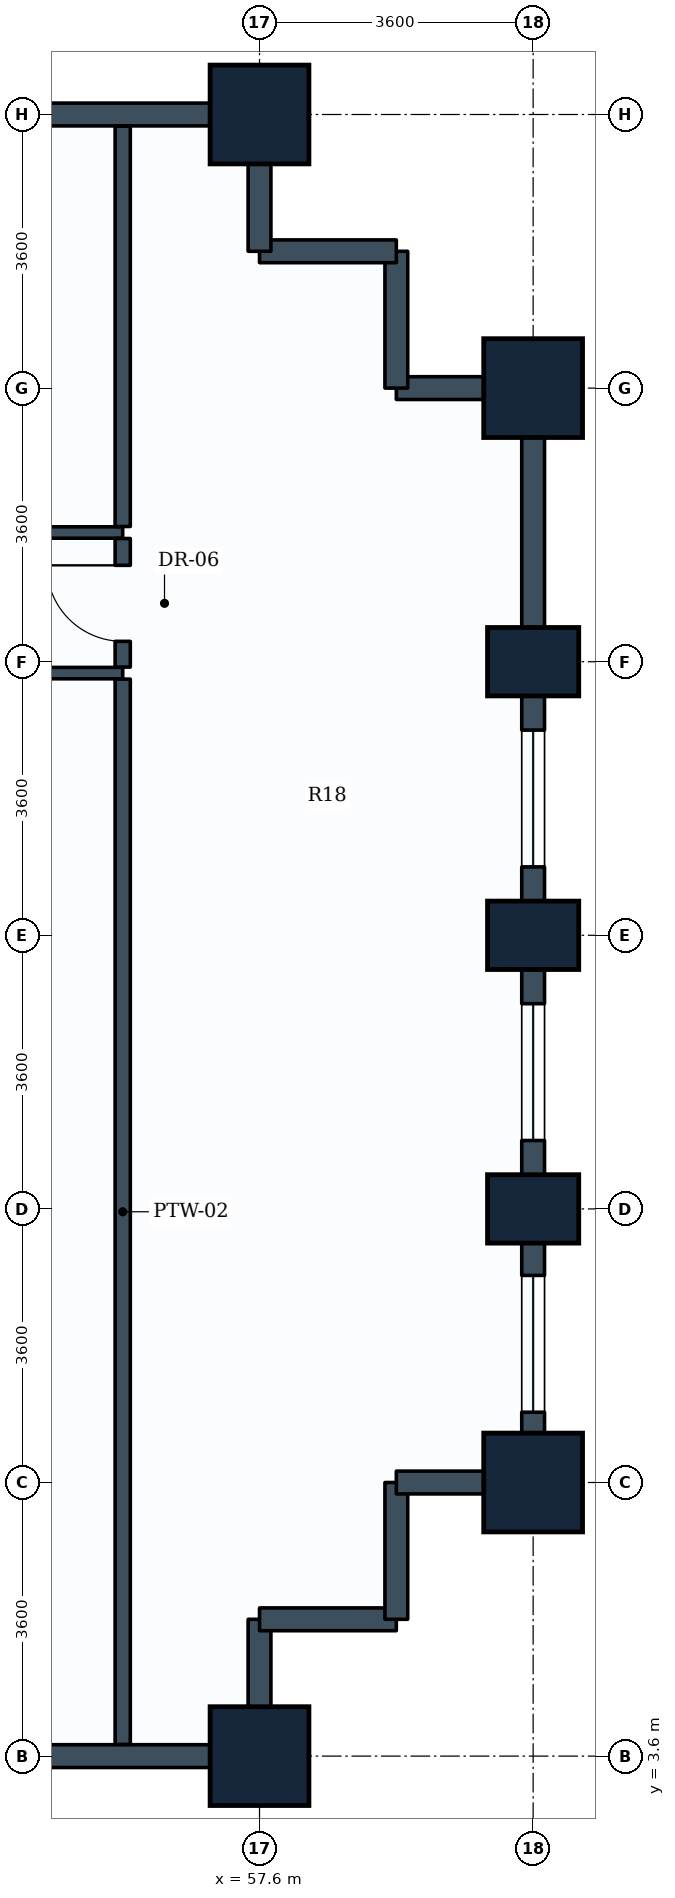
"""IFC4 building model, lengths in metres.
Left out: names, types, materials, properties, quantities, classifications, styles, units other than length and angle.
Written with IfcOpenShell. Run it as: python <this file> out.ifc"""

import sys

from ifc_helpers import new_model, si_unit, direction, frame, frame_2d, origin, origin_2d, place, context, subcontext, project, spatial, rectangle, extrude, element, fill, save


model = new_model("IFC4")
c1 = context("Model", 3, precision=1e-05, world=origin(), true_north=direction((0.0, 1.0)))
c2 = subcontext(c1, "Body", "Model", "MODEL_VIEW")
j1 = project(units=[si_unit("LENGTHUNIT", "METRE"), si_unit("PLANEANGLEUNIT", "RADIAN")], contexts=[c1])
p1 = place(None, origin())
s1 = spatial("IfcSite", under=j1, at=p1, CompositionType="ELEMENT")
p2 = place(p1, origin())
s2 = spatial("IfcBuilding", under=s1, at=p2, CompositionType="ELEMENT")
p3 = place(p2, frame((0.0, 0.0, 47.4)))
s3 = spatial("IfcBuildingStorey", under=s2, at=p3, CompositionType="ELEMENT", Elevation=47.4)
for number, where, z_axis, x_axis in (
    (1, (57.6, 3.6, 0.0), (0.0, 0.0, 1.0), (1.0, 0.0, 0.0)),
    (2, (57.6, 25.2, 0.0), (0.0, 0.0, 1.0), (1.0, 0.0, 0.0)),
    (3, (61.2, 7.2, 0.0), (0.0, 0.0, 1.0), (1.0, 0.0, 0.0)),
):
    element("IfcColumn", number, at=place(p3, frame(where, z_axis=z_axis, x_axis=x_axis)), inside=s3, PredefinedType="COLUMN", context=c2, shape_type="SweptSolid", body=[
        extrude(rectangle(XDim=1.3, YDim=1.3, at=origin_2d()), origin(), (0.0, 0.0, 1.0), 3.9),
    ])
for number, where, z_axis, x_axis in (
    (4, (61.2, 10.8, 0.0), (0.0, 0.0, 1.0), (0.0, 1.0, 0.0)),
    (5, (61.2, 14.4, 0.0), (0.0, 0.0, 1.0), (0.0, 1.0, 0.0)),
    (6, (61.2, 18.0, 0.0), (0.0, 0.0, 1.0), (0.0, 1.0, 0.0)),
):
    element("IfcColumn", number, at=place(p3, frame(where, z_axis=z_axis, x_axis=x_axis)), inside=s3, PredefinedType="COLUMN", context=c2, shape_type="SweptSolid", body=[
        extrude(rectangle(XDim=0.9, YDim=1.2, at=origin_2d()), origin(), (0.0, 0.0, 1.0), 3.9),
    ])
p4 = place(p3, frame((61.2, 21.6, 0.0), z_axis=(0.0, 0.0, 1.0), x_axis=(0.0, 1.0, 0.0)))
e7 = element("IfcColumn", 7, at=p4, inside=s3, PredefinedType="COLUMN", context=c2, shape_type="SweptSolid", body=[
    extrude(rectangle(XDim=1.3, YDim=1.3, at=origin_2d()), origin(), (0.0, 0.0, 1.0), 3.9),
])
p5 = place(p3, frame((57.6, 3.6, 0.0), z_axis=(0.0, 0.0, 1.0), x_axis=(-1.0, 0.0, 0.0)))
e8 = element("IfcWall", 8, at=p5, inside=s3, PredefinedType="STANDARD", context=c2, shape_type="SweptSolid", body=[
    extrude(rectangle(XDim=3.6, YDim=0.3, at=frame_2d((1.8, 0.0))), origin(), (0.0, 0.0, 1.0), 2.93),
])
p6 = place(p3, frame((57.6, 5.4, 0.0), z_axis=(0.0, 0.0, 1.0), x_axis=(0.0, -1.0, 0.0)))
e9 = element("IfcWall", 9, at=p6, inside=s3, PredefinedType="STANDARD", context=c2, shape_type="SweptSolid", body=[
    extrude(rectangle(XDim=1.8, YDim=0.3, at=frame_2d((0.9, 0.0))), origin(), (0.0, 0.0, 1.0), 2.93),
])
p7 = place(p3, frame((59.4, 5.4, 0.0), z_axis=(0.0, 0.0, 1.0), x_axis=(-1.0, 0.0, 0.0)))
e10 = element("IfcWall", 10, at=p7, inside=s3, PredefinedType="STANDARD", context=c2, shape_type="SweptSolid", body=[
    extrude(rectangle(XDim=1.8, YDim=0.3, at=frame_2d((0.9, 0.0))), origin(), (0.0, 0.0, 1.0), 3.635),
])
p8 = place(p3, frame((59.4, 7.2, 0.0), z_axis=(0.0, 0.0, 1.0), x_axis=(0.0, -1.0, 0.0)))
e11 = element("IfcWall", 11, at=p8, inside=s3, PredefinedType="STANDARD", context=c2, shape_type="SweptSolid", body=[
    extrude(rectangle(XDim=1.8, YDim=0.3, at=frame_2d((0.9, 0.0))), origin(), (0.0, 0.0, 1.0), 3.635),
])
p9 = place(p3, frame((61.2, 7.2, 0.0), z_axis=(0.0, 0.0, 1.0), x_axis=(-1.0, 0.0, 0.0)))
e12 = element("IfcWall", 12, at=p9, inside=s3, PredefinedType="STANDARD", context=c2, shape_type="SweptSolid", body=[
    extrude(rectangle(XDim=1.8, YDim=0.3, at=frame_2d((0.9, 0.0))), origin(), (0.0, 0.0, 1.0), 2.93),
])
p10 = place(p3, frame((61.2, 10.8, 0.0), z_axis=(0.0, 0.0, 1.0), x_axis=(0.0, -1.0, 0.0)))
e13 = element("IfcWall", 13, at=p10, inside=s3, PredefinedType="STANDARD", context=c2, shape_type="SweptSolid", body=[
    extrude(rectangle(XDim=3.6, YDim=0.3, at=frame_2d((1.8, 0.0))), origin(), (0.0, 0.0, 1.0), 2.93),
])
p11 = place(p10, frame((0.875, 0.0, 0.85)))
e14 = element("IfcOpeningElement", 14, at=p11, cuts=e13, PredefinedType="OPENING", context=c2, shape_type="SweptSolid", body=[
    extrude(rectangle(XDim=1.8, YDim=1.35, at=frame_2d((0.9, 0.675))), frame((0.0, 0.16, 0.0), z_axis=(0.0, -1.0, 0.0), x_axis=(1.0, 0.0, 0.0)), (0.0, 0.0, 1.0), 0.32),
])
p12 = place(p3, frame((61.2, 14.4, 0.0), z_axis=(0.0, 0.0, 1.0), x_axis=(0.0, -1.0, 0.0)))
e15 = element("IfcWall", 15, at=p12, inside=s3, PredefinedType="STANDARD", context=c2, shape_type="SweptSolid", body=[
    extrude(rectangle(XDim=3.6, YDim=0.3, at=frame_2d((1.8, 0.0))), origin(), (0.0, 0.0, 1.0), 2.93),
])
p13 = place(p12, frame((0.9, 0.0, 0.85)))
e16 = element("IfcOpeningElement", 16, at=p13, cuts=e15, PredefinedType="OPENING", context=c2, shape_type="SweptSolid", body=[
    extrude(rectangle(XDim=1.8, YDim=1.35, at=frame_2d((0.9, 0.675))), frame((0.0, 0.16, 0.0), z_axis=(0.0, -1.0, 0.0), x_axis=(1.0, 0.0, 0.0)), (0.0, 0.0, 1.0), 0.32),
])
p14 = place(p3, frame((61.2, 18.0, 0.0), z_axis=(0.0, 0.0, 1.0), x_axis=(0.0, -1.0, 0.0)))
e17 = element("IfcWall", 17, at=p14, inside=s3, PredefinedType="STANDARD", context=c2, shape_type="SweptSolid", body=[
    extrude(rectangle(XDim=3.6, YDim=0.3, at=frame_2d((1.8, 0.0))), origin(), (0.0, 0.0, 1.0), 2.93),
])
p15 = place(p14, frame((0.9, 0.0, 0.85)))
e18 = element("IfcOpeningElement", 18, at=p15, cuts=e17, PredefinedType="OPENING", context=c2, shape_type="SweptSolid", body=[
    extrude(rectangle(XDim=1.8, YDim=1.35, at=frame_2d((0.9, 0.675))), frame((0.0, 0.16, 0.0), z_axis=(0.0, -1.0, 0.0), x_axis=(1.0, 0.0, 0.0)), (0.0, 0.0, 1.0), 0.32),
])
p16 = place(p3, frame((61.2, 21.6, 0.0), z_axis=(0.0, 0.0, 1.0), x_axis=(0.0, -1.0, 0.0)))
e19 = element("IfcWall", 19, at=p16, inside=s3, PredefinedType="STANDARD", context=c2, shape_type="SweptSolid", body=[
    extrude(rectangle(XDim=3.6, YDim=0.3, at=frame_2d((1.8, 0.0))), origin(), (0.0, 0.0, 1.0), 2.93),
])
p17 = place(p3, frame((61.2, 21.6, 0.0), z_axis=(0.0, 0.0, 1.0), x_axis=(-1.0, 0.0, 0.0)))
e20 = element("IfcWall", 20, at=p17, inside=s3, PredefinedType="STANDARD", context=c2, shape_type="SweptSolid", body=[
    extrude(rectangle(XDim=1.8, YDim=0.3, at=frame_2d((0.9, 0.0))), origin(), (0.0, 0.0, 1.0), 2.93),
])
for number, where, z_axis, x_axis in (
    (21, (59.4, 23.4, 0.0), (0.0, 0.0, 1.0), (0.0, -1.0, 0.0)),
    (22, (57.6, 23.4, 0.0), (0.0, 0.0, 1.0), (1.0, 0.0, 0.0)),
):
    element("IfcWall", number, at=place(p3, frame(where, z_axis=z_axis, x_axis=x_axis)), inside=s3, PredefinedType="STANDARD", context=c2, shape_type="SweptSolid", body=[
        extrude(rectangle(XDim=1.8, YDim=0.3, at=frame_2d((0.9, 0.0))), origin(), (0.0, 0.0, 1.0), 3.635),
    ])
p18 = place(p3, frame((57.6, 25.2, 0.0), z_axis=(0.0, 0.0, 1.0), x_axis=(0.0, -1.0, 0.0)))
e23 = element("IfcWall", 23, at=p18, inside=s3, PredefinedType="STANDARD", context=c2, shape_type="SweptSolid", body=[
    extrude(rectangle(XDim=1.8, YDim=0.3, at=frame_2d((0.9, 0.0))), origin(), (0.0, 0.0, 1.0), 2.93),
])
p19 = place(p3, frame((54.0, 25.2, 0.0), z_axis=(0.0, 0.0, 1.0), x_axis=(1.0, 0.0, 0.0)))
e24 = element("IfcWall", 24, at=p19, inside=s3, PredefinedType="STANDARD", context=c2, shape_type="SweptSolid", body=[
    extrude(rectangle(XDim=3.6, YDim=0.3, at=frame_2d((1.8, 0.0))), origin(), (0.0, 0.0, 1.0), 2.93),
])
p20 = place(p3, frame((48.629, 17.85, 0.0), z_axis=(0.0, 0.0, 1.0), x_axis=(1.0, 0.0, 0.0)))
e25 = element("IfcWall", 25, at=p20, inside=s3, PredefinedType="PARTITIONING", context=c2, shape_type="SweptSolid", body=[
    extrude(rectangle(XDim=7.171, YDim=0.15, at=frame_2d((3.585, 0.0))), origin(), (0.0, 0.0, 1.0), 3.04),
])
p21 = place(p20, frame((3.046, 0.0, 0.0)))
e26 = element("IfcOpeningElement", 26, at=p21, cuts=e25, PredefinedType="OPENING", context=c2, shape_type="SweptSolid", body=[
    extrude(rectangle(XDim=1.0, YDim=2.1, at=frame_2d((0.5, 1.05))), frame((0.0, 0.085, 0.0), z_axis=(0.0, -1.0, 0.0), x_axis=(1.0, 0.0, 0.0)), (0.0, 0.0, 1.0), 0.17),
])
p22 = place(p3, frame((47.479, 19.7, 0.0), z_axis=(0.0, 0.0, 1.0), x_axis=(1.0, 0.0, 0.0)))
e27 = element("IfcWall", 27, at=p22, inside=s3, PredefinedType="PARTITIONING", context=c2, shape_type="SweptSolid", body=[
    extrude(rectangle(XDim=8.321, YDim=0.15, at=frame_2d((4.161, 0.0))), origin(), (0.0, 0.0, 1.0), 3.04),
])
p23 = place(p22, frame((3.621, 0.0, 0.0)))
e28 = element("IfcOpeningElement", 28, at=p23, cuts=e27, PredefinedType="OPENING", context=c2, shape_type="SweptSolid", body=[
    extrude(rectangle(XDim=1.0, YDim=2.1, at=frame_2d((0.5, 1.05))), frame((0.0, 0.085, 0.0), z_axis=(0.0, -1.0, 0.0), x_axis=(1.0, 0.0, 0.0)), (0.0, 0.0, 1.0), 0.17),
])
p24 = place(p3, frame((55.8, 3.754, 0.0), z_axis=(0.0, 0.0, 1.0), x_axis=(0.0, 1.0, 0.0)))
e29 = element("IfcWall", 29, at=p24, inside=s3, PredefinedType="PARTITIONING", context=c2, shape_type="SweptSolid", body=[
    extrude(rectangle(XDim=14.017, YDim=0.2, at=frame_2d((7.009, 0.0))), origin(), (0.0, 0.0, 1.0), 2.93),
])
p25 = place(p3, frame((55.8, 19.779, 0.0), z_axis=(0.0, 0.0, 1.0), x_axis=(0.0, 1.0, 0.0)))
e30 = element("IfcWall", 30, at=p25, inside=s3, PredefinedType="PARTITIONING", context=c2, shape_type="SweptSolid", body=[
    extrude(rectangle(XDim=5.267, YDim=0.2, at=frame_2d((2.633, 0.0))), origin(), (0.0, 0.0, 1.0), 2.93),
])
p26 = place(p3, frame((55.8, 17.929, 0.0), z_axis=(0.0, 0.0, 1.0), x_axis=(0.0, 1.0, 0.0)))
e31 = element("IfcWall", 31, at=p26, inside=s3, PredefinedType="PARTITIONING", context=c2, shape_type="SweptSolid", body=[
    extrude(rectangle(XDim=1.692, YDim=0.2, at=frame_2d((0.846, 0.0))), origin(), (0.0, 0.0, 1.0), 3.635),
])
p27 = place(p26, frame((0.339, 0.0, 0.0)))
e32 = element("IfcOpeningElement", 32, at=p27, cuts=e31, PredefinedType="OPENING", context=c2, shape_type="SweptSolid", body=[
    extrude(rectangle(XDim=1.0, YDim=2.1, at=frame_2d((0.5, 1.05))), frame((0.0, 0.11, 0.0), z_axis=(0.0, -1.0, 0.0), x_axis=(1.0, 0.0, 0.0)), (0.0, 0.0, 1.0), 0.22),
])
p28 = place(p11, origin())
e33 = element("IfcWindow", 33, at=p28, inside=s3, PartitioningType="SINGLE_PANEL", PredefinedType="WINDOW", context=c2, shape_type="SweptSolid", body=[
    extrude(rectangle(XDim=1.8, YDim=1.35, at=frame_2d((0.9, 0.675))), frame((0.0, 0.03, 0.0), z_axis=(0.0, -1.0, 0.0), x_axis=(1.0, 0.0, 0.0)), (0.0, 0.0, 1.0), 0.06),
])
fill(e14, e33)
p29 = place(p13, origin())
e34 = element("IfcWindow", 34, at=p29, inside=s3, PartitioningType="SINGLE_PANEL", PredefinedType="WINDOW", context=c2, shape_type="SweptSolid", body=[
    extrude(rectangle(XDim=1.8, YDim=1.35, at=frame_2d((0.9, 0.675))), frame((0.0, 0.03, 0.0), z_axis=(0.0, -1.0, 0.0), x_axis=(1.0, 0.0, 0.0)), (0.0, 0.0, 1.0), 0.06),
])
fill(e16, e34)
p30 = place(p15, origin())
e35 = element("IfcWindow", 35, at=p30, inside=s3, PartitioningType="SINGLE_PANEL", PredefinedType="WINDOW", context=c2, shape_type="SweptSolid", body=[
    extrude(rectangle(XDim=1.8, YDim=1.35, at=frame_2d((0.9, 0.675))), frame((0.0, 0.03, 0.0), z_axis=(0.0, -1.0, 0.0), x_axis=(1.0, 0.0, 0.0)), (0.0, 0.0, 1.0), 0.06),
])
fill(e18, e35)
p31 = place(p27, origin())
e36 = element("IfcDoor", 36, at=p31, inside=s3, OperationType="SINGLE_SWING_RIGHT", PredefinedType="DOOR", context=c2, shape_type="SweptSolid", body=[
    extrude(rectangle(XDim=1.0, YDim=2.1, at=frame_2d((0.5, 1.05))), frame((0.0, 0.025, 0.0), z_axis=(0.0, -1.0, 0.0), x_axis=(1.0, 0.0, 0.0)), (0.0, 0.0, 1.0), 0.05),
])
fill(e32, e36)
save(model, sys.argv[1])
